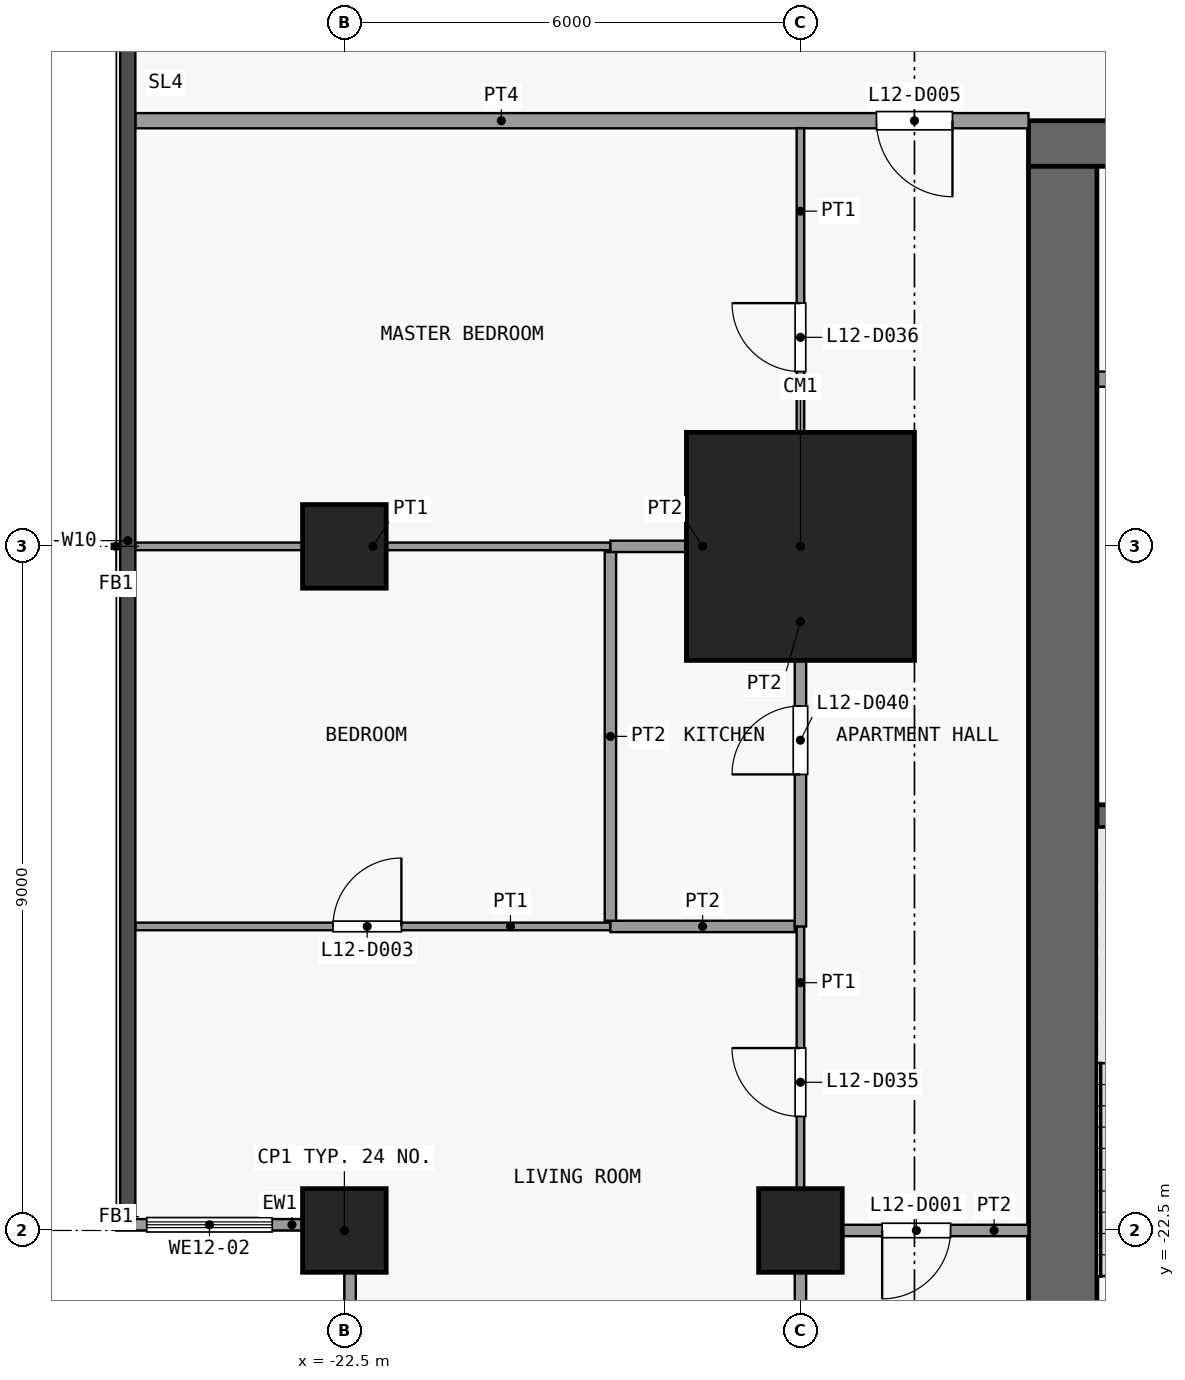
"""IFC4 building model, lengths in metres.
Left out: names, types, materials, properties, quantities, classifications, styles, units other than length and angle.
Written with IfcOpenShell. Run it as: python <this file> out.ifc"""

import sys

from ifc_helpers import new_model, si_unit, direction, frame, frame_2d, origin, origin_2d, place, context, subcontext, project, spatial, rectangle, extrude, element, fill, save


model = new_model("IFC4")
c1 = context("Model", 3, precision=1e-05, world=origin(), true_north=direction((0.0, 1.0)))
c2 = subcontext(c1, "Body", "Model", "MODEL_VIEW")
j1 = project(units=[si_unit("LENGTHUNIT", "METRE"), si_unit("PLANEANGLEUNIT", "RADIAN")], contexts=[c1])
p1 = place(None, origin())
s1 = spatial("IfcSite", under=j1, at=p1, CompositionType="ELEMENT")
p2 = place(p1, origin())
s2 = spatial("IfcBuilding", under=s1, at=p2, CompositionType="ELEMENT")
p3 = place(p2, frame((0.0, 0.0, 54.1)))
s3 = spatial("IfcBuildingStorey", under=s2, at=p3, CompositionType="ELEMENT", Elevation=54.1)
for number, where, z_axis, x_axis in (
    (1, (-22.5, -22.5, 0.0), (0.0, 0.0, 1.0), (1.0, 0.0, 0.0)),
    (2, (-22.5, -13.5, 0.0), (0.0, 0.0, 1.0), (1.0, 0.0, 0.0)),
    (3, (-16.5, -22.5, 0.0), (0.0, 0.0, 1.0), (1.0, 0.0, 0.0)),
):
    element("IfcColumn", number, at=place(p3, frame(where, z_axis=z_axis, x_axis=x_axis)), inside=s3, PredefinedType="COLUMN", context=c2, shape_type="SweptSolid", body=[
        extrude(rectangle(XDim=1.1, YDim=1.1, at=origin_2d()), origin(), (0.0, 0.0, 1.0), 3.6),
    ])
p4 = place(p3, frame((-16.5, -13.5, 0.0), z_axis=(0.0, 0.0, 1.0), x_axis=(1.0, 0.0, 0.0)))
e4 = element("IfcColumn", 4, at=p4, inside=s3, PredefinedType="COLUMN", context=c2, shape_type="SweptSolid", body=[
    extrude(rectangle(XDim=3.0, YDim=3.0, at=origin_2d()), origin(), (0.0, 0.0, 1.0), 3.6),
])
p5 = place(p3, frame((-13.5, -8.2, 0.0), z_axis=(0.0, 0.0, 1.0), x_axis=(1.0, 0.0, 0.0)))
e5 = element("IfcWall", 5, at=p5, inside=s3, PredefinedType="SHEAR", context=c2, shape_type="SweptSolid", body=[
    extrude(rectangle(XDim=27.0, YDim=0.6, at=frame_2d((13.5, 0.0))), origin(), (0.0, 0.0, 1.0), 3.3),
])
p6 = place(p5, frame((7.8, 0.0, 0.0)))
e6 = element("IfcOpeningElement", 6, at=p6, cuts=e5, PredefinedType="OPENING", context=c2, shape_type="SweptSolid", body=[
    extrude(rectangle(XDim=1.8, YDim=2.1, at=frame_2d((0.9, 1.05))), frame((0.0, 0.31, 0.0), z_axis=(0.0, -1.0, 0.0), x_axis=(1.0, 0.0, 0.0)), (0.0, 0.0, 1.0), 0.62),
])
p7 = place(p5, frame((17.4, 0.0, 0.0)))
e7 = element("IfcOpeningElement", 7, at=p7, cuts=e5, PredefinedType="OPENING", context=c2, shape_type="SweptSolid", body=[
    extrude(rectangle(XDim=1.8, YDim=2.1, at=frame_2d((0.9, 1.05))), frame((0.0, 0.31, 0.0), z_axis=(0.0, -1.0, 0.0), x_axis=(1.0, 0.0, 0.0)), (0.0, 0.0, 1.0), 0.62),
])
p8 = place(p5, frame((2.725, 0.0, 0.0)))
e8 = element("IfcOpeningElement", 8, at=p8, cuts=e5, PredefinedType="OPENING", context=c2, shape_type="SweptSolid", body=[
    extrude(rectangle(XDim=0.9, YDim=2.1, at=frame_2d((0.45, 1.05))), frame((0.0, 0.31, 0.0), z_axis=(0.0, -1.0, 0.0), x_axis=(1.0, 0.0, 0.0)), (0.0, 0.0, 1.0), 0.62),
])
p9 = place(p5, frame((23.375, 0.0, 0.0)))
e9 = element("IfcOpeningElement", 9, at=p9, cuts=e5, PredefinedType="OPENING", context=c2, shape_type="SweptSolid", body=[
    extrude(rectangle(XDim=0.9, YDim=2.1, at=frame_2d((0.45, 1.05))), frame((0.0, 0.31, 0.0), z_axis=(0.0, -1.0, 0.0), x_axis=(1.0, 0.0, 0.0)), (0.0, 0.0, 1.0), 0.62),
])
p10 = place(p3, frame((-13.05, -24.6, 0.0), z_axis=(0.0, 0.0, 1.0), x_axis=(0.0, 1.0, 0.0)))
e10 = element("IfcWall", 10, at=p10, inside=s3, PredefinedType="SHEAR", context=c2, shape_type="SweptSolid", body=[
    extrude(rectangle(XDim=16.1, YDim=0.9, at=frame_2d((8.05, 0.0))), origin(), (0.0, 0.0, 1.0), 3.3),
])
p11 = place(p3, frame((-12.6, -17.05, 0.0), z_axis=(0.0, 0.0, 1.0), x_axis=(1.0, 0.0, 0.0)))
e11 = element("IfcWall", 11, at=p11, inside=s3, PredefinedType="SHEAR", context=c2, shape_type="SweptSolid", body=[
    extrude(rectangle(XDim=2.85, YDim=0.3, at=frame_2d((1.425, 0.0))), origin(), (0.0, 0.0, 1.0), 3.3),
])
p12 = place(p3, frame((-12.6, -11.3, 0.0), z_axis=(0.0, 0.0, 1.0), x_axis=(1.0, 0.0, 0.0)))
e12 = element("IfcWall", 12, at=p12, inside=s3, PredefinedType="PARTITIONING", context=c2, shape_type="SweptSolid", body=[
    extrude(rectangle(XDim=1.45, YDim=0.2, at=frame_2d((0.725, 0.0))), origin(), (0.0, 0.0, 1.0), 3.3),
])
p13 = place(p3, frame((-22.425, -25.25, 0.0), z_axis=(0.0, 0.0, 1.0), x_axis=(0.0, 1.0, 0.0)))
e13 = element("IfcWall", 13, at=p13, inside=s3, PredefinedType="SOLIDWALL", context=c2, shape_type="SweptSolid", body=[
    extrude(rectangle(XDim=2.2, YDim=0.15, at=frame_2d((1.1, 0.0))), origin(), (0.0, 0.0, 1.0), 3.3),
])
p14 = place(p13, frame((0.4, 0.0, 0.9)))
e14 = element("IfcOpeningElement", 14, at=p14, cuts=e13, PredefinedType="OPENING", context=c2, shape_type="SweptSolid", body=[
    extrude(rectangle(XDim=1.4, YDim=2.4, at=frame_2d((0.7, 1.2))), frame((0.0, 0.085, 0.0), z_axis=(0.0, -1.0, 0.0), x_axis=(1.0, 0.0, 0.0)), (0.0, 0.0, 1.0), 0.17),
])
p15 = place(p3, frame((-23.05, -22.425, 0.0), z_axis=(0.0, 0.0, 1.0), x_axis=(-1.0, 0.0, 0.0)))
e15 = element("IfcWall", 15, at=p15, inside=s3, PredefinedType="SOLIDWALL", context=c2, shape_type="SweptSolid", body=[
    extrude(rectangle(XDim=2.45, YDim=0.15, at=frame_2d((1.225, 0.0))), origin(), (0.0, 0.0, 1.0), 3.3),
])
p16 = place(p15, frame((0.4, 0.0, 0.9)))
e16 = element("IfcOpeningElement", 16, at=p16, cuts=e15, PredefinedType="OPENING", context=c2, shape_type="SweptSolid", body=[
    extrude(rectangle(XDim=1.65, YDim=2.4, at=frame_2d((0.825, 1.2))), frame((0.0, 0.085, 0.0), z_axis=(0.0, -1.0, 0.0), x_axis=(1.0, 0.0, 0.0)), (0.0, 0.0, 1.0), 0.17),
])
p17 = place(p3, frame((-16.425, -22.5, 0.0), z_axis=(0.0, 0.0, 1.0), x_axis=(1.0, 0.0, 0.0)))
e17 = element("IfcWall", 17, at=p17, inside=s3, PredefinedType="PARTITIONING", context=c2, shape_type="SweptSolid", body=[
    extrude(rectangle(XDim=2.925, YDim=0.15, at=frame_2d((1.462, 0.0))), origin(), (0.0, 0.0, 1.0), 3.3),
])
p18 = place(p17, frame((1.0, 0.0, 0.0)))
e18 = element("IfcOpeningElement", 18, at=p18, cuts=e17, PredefinedType="OPENING", context=c2, shape_type="SweptSolid", body=[
    extrude(rectangle(XDim=0.9, YDim=2.1, at=frame_2d((0.45, 1.05))), frame((0.0, 0.085, 0.0), z_axis=(0.0, -1.0, 0.0), x_axis=(1.0, 0.0, 0.0)), (0.0, 0.0, 1.0), 0.17),
])
p19 = place(p3, frame((-25.25, -18.5, 0.0), z_axis=(0.0, 0.0, 1.0), x_axis=(1.0, 0.0, 0.0)))
e19 = element("IfcWall", 19, at=p19, inside=s3, PredefinedType="PARTITIONING", context=c2, shape_type="SweptSolid", body=[
    extrude(rectangle(XDim=6.25, YDim=0.1, at=frame_2d((3.125, 0.0))), origin(), (0.0, 0.0, 1.0), 3.3),
])
p20 = place(p19, frame((2.6, 0.0, 0.0)))
e20 = element("IfcOpeningElement", 20, at=p20, cuts=e19, PredefinedType="OPENING", context=c2, shape_type="SweptSolid", body=[
    extrude(rectangle(XDim=0.9, YDim=2.1, at=frame_2d((0.45, 1.05))), frame((0.0, 0.06, 0.0), z_axis=(0.0, -1.0, 0.0), x_axis=(1.0, 0.0, 0.0)), (0.0, 0.0, 1.0), 0.12),
])
p21 = place(p3, frame((-19.0, -18.5, 0.0), z_axis=(0.0, 0.0, 1.0), x_axis=(1.0, 0.0, 0.0)))
e21 = element("IfcWall", 21, at=p21, inside=s3, PredefinedType="PARTITIONING", context=c2, shape_type="SweptSolid", body=[
    extrude(rectangle(XDim=2.425, YDim=0.15, at=frame_2d((1.212, 0.0))), origin(), (0.0, 0.0, 1.0), 3.3),
])
p22 = place(p3, frame((-25.25, -13.5, 0.0), z_axis=(0.0, 0.0, 1.0), x_axis=(1.0, 0.0, 0.0)))
e22 = element("IfcWall", 22, at=p22, inside=s3, PredefinedType="PARTITIONING", context=c2, shape_type="SweptSolid", body=[
    extrude(rectangle(XDim=6.25, YDim=0.1, at=frame_2d((3.125, 0.0))), origin(), (0.0, 0.0, 1.0), 3.3),
])
p23 = place(p3, frame((-19.0, -13.5, 0.0), z_axis=(0.0, 0.0, 1.0), x_axis=(1.0, 0.0, 0.0)))
e23 = element("IfcWall", 23, at=p23, inside=s3, PredefinedType="PARTITIONING", context=c2, shape_type="SweptSolid", body=[
    extrude(rectangle(XDim=2.425, YDim=0.15, at=frame_2d((1.212, 0.0))), origin(), (0.0, 0.0, 1.0), 3.3),
])
p24 = place(p3, frame((-25.25, -7.9, 0.0), z_axis=(0.0, 0.0, 1.0), x_axis=(1.0, 0.0, 0.0)))
e24 = element("IfcWall", 24, at=p24, inside=s3, PredefinedType="PARTITIONING", context=c2, shape_type="SweptSolid", body=[
    extrude(rectangle(XDim=11.75, YDim=0.2, at=frame_2d((5.875, 0.0))), origin(), (0.0, 0.0, 1.0), 3.3),
])
p25 = place(p24, frame((9.75, 0.0, 0.0)))
e25 = element("IfcOpeningElement", 25, at=p25, cuts=e24, PredefinedType="OPENING", context=c2, shape_type="SweptSolid", body=[
    extrude(rectangle(XDim=1.0, YDim=2.1, at=frame_2d((0.5, 1.05))), frame((0.0, 0.11, 0.0), z_axis=(0.0, -1.0, 0.0), x_axis=(1.0, 0.0, 0.0)), (0.0, 0.0, 1.0), 0.22),
])
p26 = place(p3, frame((-19.0, -18.425, 0.0), z_axis=(0.0, 0.0, 1.0), x_axis=(0.0, 1.0, 0.0)))
e26 = element("IfcWall", 26, at=p26, inside=s3, PredefinedType="PARTITIONING", context=c2, shape_type="SweptSolid", body=[
    extrude(rectangle(XDim=4.85, YDim=0.15, at=frame_2d((2.425, 0.0))), origin(), (0.0, 0.0, 1.0), 3.3),
])
p27 = place(p3, frame((-16.5, -22.5, 0.0), z_axis=(0.0, 0.0, 1.0), x_axis=(0.0, 1.0, 0.0)))
e27 = element("IfcWall", 27, at=p27, inside=s3, PredefinedType="PARTITIONING", context=c2, shape_type="SweptSolid", body=[
    extrude(rectangle(XDim=4.0, YDim=0.1, at=frame_2d((2.0, 0.0))), origin(), (0.0, 0.0, 1.0), 3.3),
])
p28 = place(p27, frame((1.5, 0.0, 0.0)))
e28 = element("IfcOpeningElement", 28, at=p28, cuts=e27, PredefinedType="OPENING", context=c2, shape_type="SweptSolid", body=[
    extrude(rectangle(XDim=0.9, YDim=2.1, at=frame_2d((0.45, 1.05))), frame((0.0, 0.06, 0.0), z_axis=(0.0, -1.0, 0.0), x_axis=(1.0, 0.0, 0.0)), (0.0, 0.0, 1.0), 0.12),
])
p29 = place(p3, frame((-16.5, -13.5, 0.0), z_axis=(0.0, 0.0, 1.0), x_axis=(0.0, 1.0, 0.0)))
e29 = element("IfcWall", 29, at=p29, inside=s3, PredefinedType="PARTITIONING", context=c2, shape_type="SweptSolid", body=[
    extrude(rectangle(XDim=5.5, YDim=0.1, at=frame_2d((2.75, 0.0))), origin(), (0.0, 0.0, 1.0), 3.3),
])
p30 = place(p29, frame((2.3, 0.0, 0.0)))
e30 = element("IfcOpeningElement", 30, at=p30, cuts=e29, PredefinedType="OPENING", context=c2, shape_type="SweptSolid", body=[
    extrude(rectangle(XDim=0.9, YDim=2.1, at=frame_2d((0.45, 1.05))), frame((0.0, 0.06, 0.0), z_axis=(0.0, -1.0, 0.0), x_axis=(1.0, 0.0, 0.0)), (0.0, 0.0, 1.0), 0.12),
])
p31 = place(p3, frame((-16.5, -25.25, 0.0), z_axis=(0.0, 0.0, 1.0), x_axis=(0.0, 1.0, 0.0)))
e31 = element("IfcWall", 31, at=p31, inside=s3, PredefinedType="PARTITIONING", context=c2, shape_type="SweptSolid", body=[
    extrude(rectangle(XDim=2.75, YDim=0.15, at=frame_2d((1.375, 0.0))), origin(), (0.0, 0.0, 1.0), 3.3),
])
p32 = place(p3, frame((-16.5, -18.5, 0.0), z_axis=(0.0, 0.0, 1.0), x_axis=(0.0, 1.0, 0.0)))
e32 = element("IfcWall", 32, at=p32, inside=s3, PredefinedType="PARTITIONING", context=c2, shape_type="SweptSolid", body=[
    extrude(rectangle(XDim=5.0, YDim=0.15, at=frame_2d((2.5, 0.0))), origin(), (0.0, 0.0, 1.0), 3.3),
])
p33 = place(p32, frame((2.0, 0.0, 0.0)))
e33 = element("IfcOpeningElement", 33, at=p33, cuts=e32, PredefinedType="OPENING", context=c2, shape_type="SweptSolid", body=[
    extrude(rectangle(XDim=0.9, YDim=2.1, at=frame_2d((0.45, 1.05))), frame((0.0, 0.085, 0.0), z_axis=(0.0, -1.0, 0.0), x_axis=(1.0, 0.0, 0.0)), (0.0, 0.0, 1.0), 0.17),
])
p34 = place(p16, origin())
e34 = element("IfcWindow", 34, at=p34, inside=s3, PartitioningType="SINGLE_PANEL", PredefinedType="WINDOW", context=c2, shape_type="SweptSolid", body=[
    extrude(rectangle(XDim=1.65, YDim=2.4, at=frame_2d((0.825, 1.2))), frame((0.0, 0.03, 0.0), z_axis=(0.0, -1.0, 0.0), x_axis=(1.0, 0.0, 0.0)), (0.0, 0.0, 1.0), 0.06),
])
fill(e16, e34)
p35 = place(p18, origin())
e35 = element("IfcDoor", 35, at=p35, inside=s3, OperationType="SINGLE_SWING_LEFT", PredefinedType="DOOR", context=c2, shape_type="SweptSolid", body=[
    extrude(rectangle(XDim=0.9, YDim=2.1, at=frame_2d((0.45, 1.05))), frame((0.0, 0.025, 0.0), z_axis=(0.0, -1.0, 0.0), x_axis=(1.0, 0.0, 0.0)), (0.0, 0.0, 1.0), 0.05),
])
fill(e18, e35)
p36 = place(p20, origin())
e36 = element("IfcDoor", 36, at=p36, inside=s3, OperationType="SINGLE_SWING_LEFT", PredefinedType="DOOR", context=c2, shape_type="SweptSolid", body=[
    extrude(rectangle(XDim=0.9, YDim=2.1, at=frame_2d((0.45, 1.05))), frame((0.0, 0.025, 0.0), z_axis=(0.0, -1.0, 0.0), x_axis=(1.0, 0.0, 0.0)), (0.0, 0.0, 1.0), 0.05),
])
fill(e20, e36)
p37 = place(p25, origin())
e37 = element("IfcDoor", 37, at=p37, inside=s3, OperationType="SINGLE_SWING_RIGHT", PredefinedType="DOOR", context=c2, shape_type="SweptSolid", body=[
    extrude(rectangle(XDim=1.0, YDim=2.1, at=frame_2d((0.5, 1.05))), frame((0.0, 0.025, 0.0), z_axis=(0.0, -1.0, 0.0), x_axis=(1.0, 0.0, 0.0)), (0.0, 0.0, 1.0), 0.05),
])
fill(e25, e37)
p38 = place(p28, origin())
e38 = element("IfcDoor", 38, at=p38, inside=s3, OperationType="SINGLE_SWING_LEFT", PredefinedType="DOOR", context=c2, shape_type="SweptSolid", body=[
    extrude(rectangle(XDim=0.9, YDim=2.1, at=frame_2d((0.45, 1.05))), frame((0.0, 0.025, 0.0), z_axis=(0.0, -1.0, 0.0), x_axis=(1.0, 0.0, 0.0)), (0.0, 0.0, 1.0), 0.05),
])
fill(e28, e38)
p39 = place(p30, origin())
e39 = element("IfcDoor", 39, at=p39, inside=s3, OperationType="SINGLE_SWING_LEFT", PredefinedType="DOOR", context=c2, shape_type="SweptSolid", body=[
    extrude(rectangle(XDim=0.9, YDim=2.1, at=frame_2d((0.45, 1.05))), frame((0.0, 0.025, 0.0), z_axis=(0.0, -1.0, 0.0), x_axis=(1.0, 0.0, 0.0)), (0.0, 0.0, 1.0), 0.05),
])
fill(e30, e39)
p40 = place(p33, origin())
e40 = element("IfcDoor", 40, at=p40, inside=s3, OperationType="SINGLE_SWING_RIGHT", PredefinedType="DOOR", context=c2, shape_type="SweptSolid", body=[
    extrude(rectangle(XDim=0.9, YDim=2.1, at=frame_2d((0.45, 1.05))), frame((0.0, 0.025, 0.0), z_axis=(0.0, -1.0, 0.0), x_axis=(1.0, 0.0, 0.0)), (0.0, 0.0, 1.0), 0.05),
])
fill(e33, e40)
save(model, sys.argv[1])
